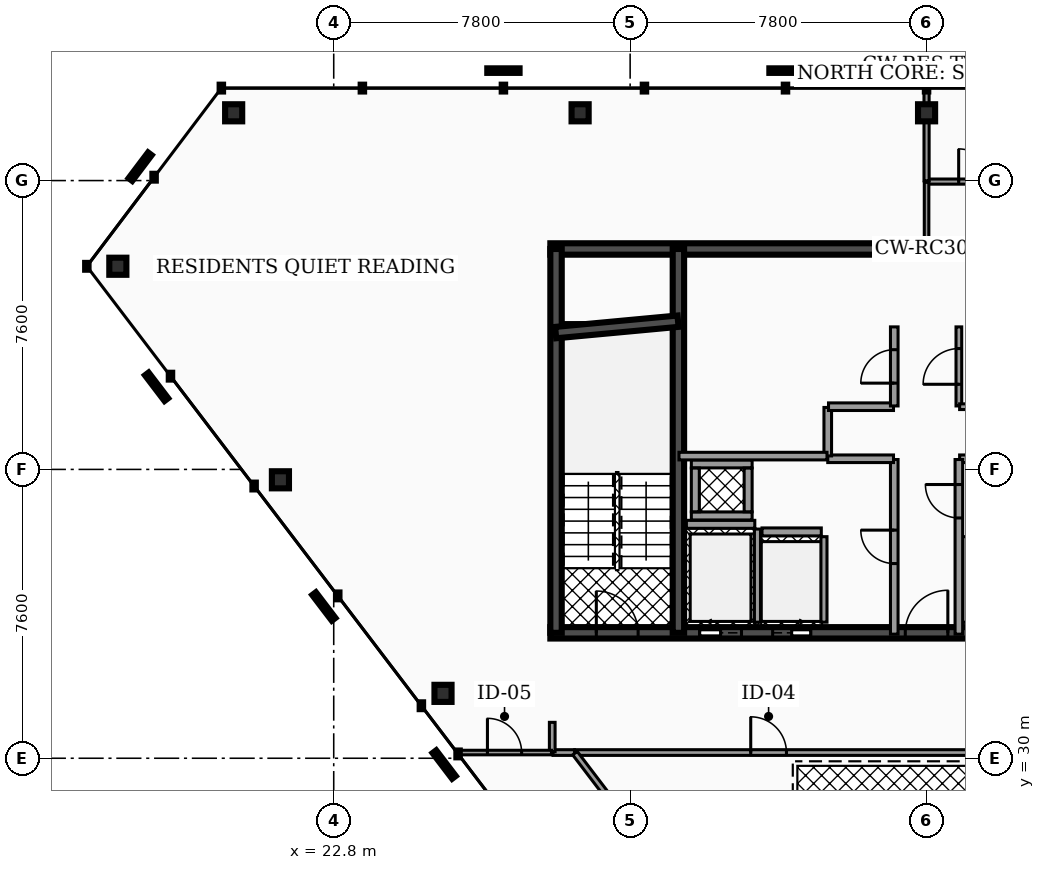
"""IFC4 building model, lengths in metres.
Left out: names, types, materials, properties, quantities, classifications, styles, units other than length and angle.
Written with IfcOpenShell. Run it as: python <this file> out.ifc"""

import sys

from ifc_helpers import new_model, si_unit, direction, frame, frame_2d, origin, origin_2d, place, context, subcontext, project, spatial, rectangle, hollow_rectangle, extrude, element, fill, save


model = new_model("IFC4")
c1 = context("Model", 3, precision=1e-05, world=origin(), true_north=direction((0.0, 1.0)))
c2 = subcontext(c1, "Body", "Model", "MODEL_VIEW")
j1 = project(units=[si_unit("LENGTHUNIT", "METRE"), si_unit("PLANEANGLEUNIT", "RADIAN")], contexts=[c1])
p1 = place(None, origin())
s1 = spatial("IfcSite", under=j1, at=p1, CompositionType="ELEMENT")
p2 = place(p1, origin())
s2 = spatial("IfcBuilding", under=s1, at=p2, CompositionType="ELEMENT")
p3 = place(p2, frame((0.0, 0.0, 282.2)))
s3 = spatial("IfcBuildingStorey", under=s2, at=p3, CompositionType="ELEMENT", Elevation=282.2)
p4 = place(p3, frame((28.5, 43.4, 0.0), z_axis=(0.0, 0.0, 1.0), x_axis=(1.0, 0.0, 0.0)))
e1 = element("IfcWall", 1, at=p4, inside=s3, PredefinedType="SHEAR", context=c2, shape_type="SweptSolid", body=[
    extrude(rectangle(XDim=19.86, YDim=0.3, at=frame_2d((9.93, 0.0))), origin(), (0.0, 0.0, 1.0), 3.18),
])
p5 = place(p3, frame((28.5, 33.3, 0.0), z_axis=(0.0, 0.0, 1.0), x_axis=(1.0, 0.0, 0.0)))
e2 = element("IfcWall", 2, at=p5, inside=s3, PredefinedType="SHEAR", context=c2, shape_type="SweptSolid", body=[
    extrude(rectangle(XDim=19.86, YDim=0.3, at=frame_2d((9.93, 0.0))), origin(), (0.0, 0.0, 1.0), 3.18),
])
p6 = place(p5, frame((3.93, 0.0, 0.0)))
e3 = element("IfcOpeningElement", 3, at=p6, cuts=e2, PredefinedType="OPENING", context=c2, shape_type="SweptSolid", body=[
    extrude(rectangle(XDim=1.1, YDim=2.15, at=frame_2d((0.55, 1.075))), frame((0.0, 0.16, 0.0), z_axis=(0.0, -1.0, 0.0), x_axis=(1.0, 0.0, 0.0)), (0.0, 0.0, 1.0), 0.32),
])
p7 = place(p5, frame((14.77, 0.0, 0.0)))
e4 = element("IfcOpeningElement", 4, at=p7, cuts=e2, PredefinedType="OPENING", context=c2, shape_type="SweptSolid", body=[
    extrude(rectangle(XDim=1.1, YDim=2.15, at=frame_2d((0.55, 1.075))), frame((0.0, 0.16, 0.0), z_axis=(0.0, -1.0, 0.0), x_axis=(1.0, 0.0, 0.0)), (0.0, 0.0, 1.0), 0.32),
])
p8 = place(p5, frame((11.25, 0.0, 0.0)))
e5 = element("IfcOpeningElement", 5, at=p8, cuts=e2, PredefinedType="OPENING", context=c2, shape_type="SweptSolid", body=[
    extrude(rectangle(XDim=1.0, YDim=2.1, at=frame_2d((0.5, 1.05))), frame((0.0, 0.16, 0.0), z_axis=(0.0, -1.0, 0.0), x_axis=(1.0, 0.0, 0.0)), (0.0, 0.0, 1.0), 0.32),
])
p9 = place(p5, frame((12.95, 0.0, 0.0)))
e6 = element("IfcOpeningElement", 6, at=p9, cuts=e2, PredefinedType="OPENING", context=c2, shape_type="SweptSolid", body=[
    extrude(rectangle(XDim=1.0, YDim=2.1, at=frame_2d((0.5, 1.05))), frame((0.0, 0.16, 0.0), z_axis=(0.0, -1.0, 0.0), x_axis=(1.0, 0.0, 0.0)), (0.0, 0.0, 1.0), 0.32),
])
p10 = place(p5, frame((5.85, 0.0, 0.0)))
e7 = element("IfcOpeningElement", 7, at=p10, cuts=e2, PredefinedType="OPENING", context=c2, shape_type="SweptSolid", body=[
    extrude(rectangle(XDim=1.0, YDim=2.1, at=frame_2d((0.5, 1.05))), frame((0.0, 0.16, 0.0), z_axis=(0.0, -1.0, 0.0), x_axis=(1.0, 0.0, 0.0)), (0.0, 0.0, 1.0), 0.32),
])
p11 = place(p5, frame((1.21, 0.0, 0.0)))
e8 = element("IfcOpeningElement", 8, at=p11, cuts=e2, PredefinedType="OPENING", context=c2, shape_type="SweptSolid", body=[
    extrude(rectangle(XDim=1.1, YDim=2.2, at=frame_2d((0.55, 1.1))), frame((0.0, 0.16, 0.0), z_axis=(0.0, -1.0, 0.0), x_axis=(1.0, 0.0, 0.0)), (0.0, 0.0, 1.0), 0.32),
])
p12 = place(p5, frame((9.34, 0.0, 0.0)))
e9 = element("IfcOpeningElement", 9, at=p12, cuts=e2, PredefinedType="OPENING", context=c2, shape_type="SweptSolid", body=[
    extrude(rectangle(XDim=1.12, YDim=2.05, at=frame_2d((0.56, 1.025))), frame((0.0, 0.16, 0.0), z_axis=(0.0, -1.0, 0.0), x_axis=(1.0, 0.0, 0.0)), (0.0, 0.0, 1.0), 0.32),
])
p13 = place(p5, frame((17.55, 0.0, 0.0)))
e10 = element("IfcOpeningElement", 10, at=p13, cuts=e2, PredefinedType="OPENING", context=c2, shape_type="SweptSolid", body=[
    extrude(rectangle(XDim=1.1, YDim=2.2, at=frame_2d((0.55, 1.1))), frame((0.0, 0.16, 0.0), z_axis=(0.0, -1.0, 0.0), x_axis=(1.0, 0.0, 0.0)), (0.0, 0.0, 1.0), 0.32),
])
for number, where, z_axis, x_axis in (
    (11, (28.65, 33.3, 0.0), (0.0, 0.0, 1.0), (0.0, 1.0, 0.0)),
    (12, (31.87, 33.3, 0.0), (0.0, 0.0, 1.0), (0.0, 1.0, 0.0)),
):
    element("IfcWall", number, at=place(p3, frame(where, z_axis=z_axis, x_axis=x_axis)), inside=s3, PredefinedType="SHEAR", context=c2, shape_type="SweptSolid", body=[
        extrude(rectangle(XDim=10.1, YDim=0.3, at=frame_2d((5.05, 0.0))), origin(), (0.0, 0.0, 1.0), 3.18),
    ])
p14 = place(p3, frame((28.64, 41.2, 0.0), z_axis=(0.0, 0.0, 1.0), x_axis=(0.995687118776, 0.092774789157, 0.0)))
e13 = element("IfcWall", 13, at=p14, inside=s3, PredefinedType="SHEAR", context=c2, shape_type="SweptSolid", body=[
    extrude(rectangle(XDim=3.234, YDim=0.3, at=frame_2d((1.617, 0.0))), origin(), (0.0, 0.0, 1.0), 3.18),
])
for number, where, z_axis, x_axis in (
    (14, (38.4, 46.983, 0.0), (0.0, 0.0, 1.0), (1.0, 0.0, 0.0)),
    (15, (29.283, 46.983, 0.0), (0.0, 0.0, 1.0), (1.0, 0.0, 0.0)),
    (16, (20.167, 46.983, 0.0), (0.0, 0.0, 1.0), (1.0, 0.0, 0.0)),
    (17, (17.119, 42.946, 0.0), (0.0, 0.0, 1.0), (1.0, 0.0, 0.0)),
    (18, (21.397, 37.327, 0.0), (0.0, 0.0, 1.0), (1.0, 0.0, 0.0)),
    (19, (25.676, 31.708, 0.0), (0.0, 0.0, 1.0), (1.0, 0.0, 0.0)),
):
    element("IfcColumn", number, at=place(p3, frame(where, z_axis=z_axis, x_axis=x_axis)), inside=s3, PredefinedType="COLUMN", context=c2, shape_type="SweptSolid", body=[
        extrude(hollow_rectangle(XDim=0.45, YDim=0.45, WallThickness=0.022, at=origin_2d()), origin(), (0.0, 0.0, 1.0), 3.18),
    ])
p15 = place(p3, frame((32.08, 36.155, 0.0), z_axis=(0.0, 0.0, 1.0), x_axis=(1.0, 0.0, 0.0)))
e20 = element("IfcWall", 20, at=p15, inside=s3, PredefinedType="SOLIDWALL", context=c2, shape_type="SweptSolid", body=[
    extrude(rectangle(XDim=1.8, YDim=0.21, at=frame_2d((0.9, 0.0))), origin(), (0.0, 0.0, 1.0), 3.18),
])
p16 = place(p3, frame((33.95, 33.58, 0.0), z_axis=(0.0, 0.0, 1.0), x_axis=(0.0, 1.0, 0.0)))
e21 = element("IfcWall", 21, at=p16, inside=s3, PredefinedType="SOLIDWALL", context=c2, shape_type="SweptSolid", body=[
    extrude(rectangle(XDim=2.45, YDim=0.16, at=frame_2d((1.225, 0.0))), origin(), (0.0, 0.0, 1.0), 3.18),
])
p17 = place(p3, frame((39.4, 33.58, 0.0), z_axis=(0.0, 0.0, 1.0), x_axis=(0.0, 1.0, 0.0)))
e22 = element("IfcWall", 22, at=p17, inside=s3, PredefinedType="SOLIDWALL", context=c2, shape_type="SweptSolid", body=[
    extrude(rectangle(XDim=2.25, YDim=0.16, at=frame_2d((1.125, 0.0))), origin(), (0.0, 0.0, 1.0), 3.18),
])
p18 = place(p3, frame((34.07, 35.955, 0.0), z_axis=(0.0, 0.0, 1.0), x_axis=(1.0, 0.0, 0.0)))
e23 = element("IfcWall", 23, at=p18, inside=s3, PredefinedType="SOLIDWALL", context=c2, shape_type="SweptSolid", body=[
    extrude(rectangle(XDim=1.56, YDim=0.21, at=frame_2d((0.78, 0.0))), origin(), (0.0, 0.0, 1.0), 3.18),
])
p19 = place(p3, frame((35.7, 33.58, 0.0), z_axis=(0.0, 0.0, 1.0), x_axis=(0.0, 1.0, 0.0)))
e24 = element("IfcWall", 24, at=p19, inside=s3, PredefinedType="SOLIDWALL", context=c2, shape_type="SweptSolid", body=[
    extrude(rectangle(XDim=2.25, YDim=0.16, at=frame_2d((1.125, 0.0))), origin(), (0.0, 0.0, 1.0), 3.18),
])
for number, where, z_axis, x_axis in (
    (25, (32.21, 36.375, 0.0), (0.0, 0.0, 1.0), (1.0, 0.0, 0.0)),
    (26, (32.21, 37.745, 0.0), (0.0, 0.0, 1.0), (1.0, 0.0, 0.0)),
):
    element("IfcWall", number, at=place(p3, frame(where, z_axis=z_axis, x_axis=x_axis)), inside=s3, PredefinedType="SOLIDWALL", context=c2, shape_type="SweptSolid", body=[
        extrude(rectangle(XDim=1.6, YDim=0.21, at=frame_2d((0.8, 0.0))), origin(), (0.0, 0.0, 1.0), 3.18),
    ])
for number, where, z_axis, x_axis in (
    (27, (32.315, 36.485, 0.0), (0.0, 0.0, 1.0), (0.0, 1.0, 0.0)),
    (28, (33.705, 36.485, 0.0), (0.0, 0.0, 1.0), (0.0, 1.0, 0.0)),
):
    element("IfcWall", number, at=place(p3, frame(where, z_axis=z_axis, x_axis=x_axis)), inside=s3, PredefinedType="SOLIDWALL", context=c2, shape_type="SweptSolid", body=[
        extrude(rectangle(XDim=1.15, YDim=0.21, at=frame_2d((0.575, 0.0))), origin(), (0.0, 0.0, 1.0), 3.18),
    ])
p20 = place(p3, frame((37.55, 33.265, 0.0), z_axis=(0.0, 0.0, 1.0), x_axis=(0.0, 1.0, 0.0)))
e29 = element("IfcWall", 29, at=p20, inside=s3, PredefinedType="PARTITIONING", context=c2, shape_type="SweptSolid", body=[
    extrude(rectangle(XDim=4.595, YDim=0.2, at=frame_2d((2.298, 0.0))), origin(), (0.0, 0.0, 1.0), 2.235),
])
p21 = place(p20, frame((1.857, 0.0, 0.0)))
e30 = element("IfcOpeningElement", 30, at=p21, cuts=e29, PredefinedType="OPENING", context=c2, shape_type="SweptSolid", body=[
    extrude(rectangle(XDim=0.88, YDim=2.05, at=frame_2d((0.44, 1.025))), frame((0.0, 0.11, 0.0), z_axis=(0.0, -1.0, 0.0), x_axis=(1.0, 0.0, 0.0)), (0.0, 0.0, 1.0), 0.22),
])
p22 = place(p3, frame((35.8, 37.88, 0.0), z_axis=(0.0, 0.0, 1.0), x_axis=(1.0, 0.0, 0.0)))
e31 = element("IfcWall", 31, at=p22, inside=s3, PredefinedType="PARTITIONING", context=c2, shape_type="SweptSolid", body=[
    extrude(rectangle(XDim=1.73, YDim=0.2, at=frame_2d((0.865, 0.0))), origin(), (0.0, 0.0, 1.0), 2.235),
])
p23 = place(p3, frame((35.8, 37.955, 0.0), z_axis=(0.0, 0.0, 1.0), x_axis=(0.0, 1.0, 0.0)))
e32 = element("IfcWall", 32, at=p23, inside=s3, PredefinedType="PARTITIONING", context=c2, shape_type="SweptSolid", body=[
    extrude(rectangle(XDim=1.275, YDim=0.2, at=frame_2d((0.637, 0.0))), origin(), (0.0, 0.0, 1.0), 2.235),
])
p24 = place(p3, frame((35.82, 39.25, 0.0), z_axis=(0.0, 0.0, 1.0), x_axis=(1.0, 0.0, 0.0)))
e33 = element("IfcWall", 33, at=p24, inside=s3, PredefinedType="PARTITIONING", context=c2, shape_type="SweptSolid", body=[
    extrude(rectangle(XDim=1.71, YDim=0.2, at=frame_2d((0.855, 0.0))), origin(), (0.0, 0.0, 1.0), 2.235),
])
p25 = place(p3, frame((37.55, 39.27, 0.0), z_axis=(0.0, 0.0, 1.0), x_axis=(0.0, 1.0, 0.0)))
e34 = element("IfcWall", 34, at=p25, inside=s3, PredefinedType="PARTITIONING", context=c2, shape_type="SweptSolid", body=[
    extrude(rectangle(XDim=2.08, YDim=0.2, at=frame_2d((1.04, 0.0))), origin(), (0.0, 0.0, 1.0), 2.235),
])
p26 = place(p25, frame((0.6, 0.0, 0.0)))
e35 = element("IfcOpeningElement", 35, at=p26, cuts=e34, PredefinedType="OPENING", context=c2, shape_type="SweptSolid", body=[
    extrude(rectangle(XDim=0.88, YDim=2.05, at=frame_2d((0.44, 1.025))), frame((0.0, 0.11, 0.0), z_axis=(0.0, -1.0, 0.0), x_axis=(1.0, 0.0, 0.0)), (0.0, 0.0, 1.0), 0.22),
])
p27 = place(p3, frame((39.27, 37.88, 0.0), z_axis=(0.0, 0.0, 1.0), x_axis=(1.0, 0.0, 0.0)))
e36 = element("IfcWall", 36, at=p27, inside=s3, PredefinedType="PARTITIONING", context=c2, shape_type="SweptSolid", body=[
    extrude(rectangle(XDim=1.93, YDim=0.2, at=frame_2d((0.965, 0.0))), origin(), (0.0, 0.0, 1.0), 2.235),
])
p28 = place(p3, frame((39.25, 33.265, 0.0), z_axis=(0.0, 0.0, 1.0), x_axis=(0.0, 1.0, 0.0)))
e37 = element("IfcWall", 37, at=p28, inside=s3, PredefinedType="PARTITIONING", context=c2, shape_type="SweptSolid", body=[
    extrude(rectangle(XDim=4.595, YDim=0.2, at=frame_2d((2.298, 0.0))), origin(), (0.0, 0.0, 1.0), 2.235),
])
p29 = place(p28, frame((3.058, 0.0, 0.0)))
e38 = element("IfcOpeningElement", 38, at=p29, cuts=e37, PredefinedType="OPENING", context=c2, shape_type="SweptSolid", body=[
    extrude(rectangle(XDim=0.88, YDim=2.05, at=frame_2d((0.44, 1.025))), frame((0.0, 0.11, 0.0), z_axis=(0.0, -1.0, 0.0), x_axis=(1.0, 0.0, 0.0)), (0.0, 0.0, 1.0), 0.22),
])
p30 = place(p3, frame((39.25, 39.27, 0.0), z_axis=(0.0, 0.0, 1.0), x_axis=(0.0, 1.0, 0.0)))
e39 = element("IfcWall", 39, at=p30, inside=s3, PredefinedType="PARTITIONING", context=c2, shape_type="SweptSolid", body=[
    extrude(rectangle(XDim=2.08, YDim=0.15, at=frame_2d((1.04, 0.0))), origin(), (0.0, 0.0, 1.0), 2.235),
])
p31 = place(p30, frame((0.57, 0.0, 0.0)))
e40 = element("IfcOpeningElement", 40, at=p31, cuts=e39, PredefinedType="OPENING", context=c2, shape_type="SweptSolid", body=[
    extrude(rectangle(XDim=0.94, YDim=2.05, at=frame_2d((0.47, 1.025))), frame((0.0, 0.085, 0.0), z_axis=(0.0, -1.0, 0.0), x_axis=(1.0, 0.0, 0.0)), (0.0, 0.0, 1.0), 0.17),
])
p32 = place(p3, frame((39.27, 39.25, 0.0), z_axis=(0.0, 0.0, 1.0), x_axis=(1.0, 0.0, 0.0)))
e41 = element("IfcWall", 41, at=p32, inside=s3, PredefinedType="PARTITIONING", context=c2, shape_type="SweptSolid", body=[
    extrude(rectangle(XDim=1.91, YDim=0.15, at=frame_2d((0.955, 0.0))), origin(), (0.0, 0.0, 1.0), 2.235),
])
p33 = place(p3, frame((31.885, 37.95, 0.0), z_axis=(0.0, 0.0, 1.0), x_axis=(1.0, 0.0, 0.0)))
e42 = element("IfcWall", 42, at=p33, inside=s3, PredefinedType="PARTITIONING", context=c2, shape_type="SweptSolid", body=[
    extrude(rectangle(XDim=3.895, YDim=0.2, at=frame_2d((1.948, 0.0))), origin(), (0.0, 0.0, 1.0), 2.235),
])
p34 = place(p3, frame((29.141, 30.15, 0.0), z_axis=(0.0, 0.0, 1.0), x_axis=(1.0, 0.0, 0.0)))
e43 = element("IfcWall", 43, at=p34, inside=s3, PredefinedType="PARTITIONING", context=c2, shape_type="SweptSolid", body=[
    extrude(rectangle(XDim=16.204, YDim=0.15, at=frame_2d((8.102, 0.0))), origin(), (0.0, 0.0, 1.0), 2.235),
])
p35 = place(p34, frame((4.632, 0.0, 0.0)))
e44 = element("IfcOpeningElement", 44, at=p35, cuts=e43, PredefinedType="OPENING", context=c2, shape_type="SweptSolid", body=[
    extrude(rectangle(XDim=0.94, YDim=2.05, at=frame_2d((0.47, 1.025))), frame((0.0, 0.085, 0.0), z_axis=(0.0, -1.0, 0.0), x_axis=(1.0, 0.0, 0.0)), (0.0, 0.0, 1.0), 0.17),
])
p36 = place(p3, frame((28.57, 30.15, 0.0), z_axis=(0.0, 0.0, 1.0), x_axis=(1.0, 0.0, 0.0)))
e45 = element("IfcWall", 45, at=p36, inside=s3, PredefinedType="PARTITIONING", context=c2, shape_type="SweptSolid", body=[
    extrude(rectangle(XDim=0.565, YDim=0.15, at=frame_2d((0.282, 0.0))), origin(), (0.0, 0.0, 1.0), 2.235),
])
p37 = place(p3, frame((28.55, 30.17, 0.0), z_axis=(0.0, 0.0, 1.0), x_axis=(0.0, 1.0, 0.0)))
e46 = element("IfcWall", 46, at=p37, inside=s3, PredefinedType="PARTITIONING", context=c2, shape_type="SweptSolid", body=[
    extrude(rectangle(XDim=0.775, YDim=0.15, at=frame_2d((0.387, 0.0))), origin(), (0.0, 0.0, 1.0), 2.235),
])
p38 = place(p3, frame((29.148, 30.134, 0.0), z_axis=(0.0, 0.0, 1.0), x_axis=(0.605873710815, -0.795560837739, 0.0)))
e47 = element("IfcWall", 47, at=p38, inside=s3, PredefinedType="PARTITIONING", context=c2, shape_type="SweptSolid", body=[
    extrude(rectangle(XDim=2.474, YDim=0.15, at=frame_2d((1.237, 0.0))), origin(), (0.0, 0.0, 1.0), 2.235),
])
p39 = place(p3, frame((26.059, 30.15, 0.0), z_axis=(0.0, 0.0, 1.0), x_axis=(1.0, 0.0, 0.0)))
e48 = element("IfcWall", 48, at=p39, inside=s3, PredefinedType="PARTITIONING", context=c2, shape_type="SweptSolid", body=[
    extrude(rectangle(XDim=2.471, YDim=0.12, at=frame_2d((1.235, 0.0))), origin(), (0.0, 0.0, 1.0), 2.235),
])
p40 = place(p39, frame((0.785, 0.0, 0.0)))
e49 = element("IfcOpeningElement", 49, at=p40, cuts=e48, PredefinedType="OPENING", context=c2, shape_type="SweptSolid", body=[
    extrude(rectangle(XDim=0.9, YDim=2.05, at=frame_2d((0.45, 1.025))), frame((0.0, 0.07, 0.0), z_axis=(0.0, -1.0, 0.0), x_axis=(1.0, 0.0, 0.0)), (0.0, 0.0, 1.0), 0.14),
])
p41 = place(p3, frame((38.42, 45.173, 0.0), z_axis=(0.0, 0.0, 1.0), x_axis=(1.0, 0.0, 0.0)))
e50 = element("IfcWall", 50, at=p41, inside=s3, PredefinedType="PARTITIONING", context=c2, shape_type="SweptSolid", body=[
    extrude(rectangle(XDim=2.51, YDim=0.135, at=frame_2d((1.255, 0.0))), origin(), (0.0, 0.0, 1.0), 2.235),
])
p42 = place(p41, frame((0.825, 0.0, 0.0)))
e51 = element("IfcOpeningElement", 51, at=p42, cuts=e50, PredefinedType="OPENING", context=c2, shape_type="SweptSolid", body=[
    extrude(rectangle(XDim=0.86, YDim=2.05, at=frame_2d((0.43, 1.025))), frame((0.0, 0.077, 0.0), z_axis=(0.0, -1.0, 0.0), x_axis=(1.0, 0.0, 0.0)), (0.0, 0.0, 1.0), 0.155),
])
p43 = place(p3, frame((38.4, 43.415, 0.0), z_axis=(0.0, 0.0, 1.0), x_axis=(0.0, 1.0, 0.0)))
e52 = element("IfcWall", 52, at=p43, inside=s3, PredefinedType="PARTITIONING", context=c2, shape_type="SweptSolid", body=[
    extrude(rectangle(XDim=1.738, YDim=0.12, at=frame_2d((0.869, 0.0))), origin(), (0.0, 0.0, 1.0), 2.235),
])
p44 = place(p3, frame((38.4, 45.193, 0.0), z_axis=(0.0, 0.0, 1.0), x_axis=(0.0, 1.0, 0.0)))
e53 = element("IfcWall", 53, at=p44, inside=s3, PredefinedType="PARTITIONING", context=c2, shape_type="SweptSolid", body=[
    extrude(rectangle(XDim=2.425, YDim=0.135, at=frame_2d((1.212, 0.0))), origin(), (0.0, 0.0, 1.0), 2.235),
])
p45 = place(p6, origin())
e54 = element("IfcDoor", 54, at=p45, inside=s3, OperationType="SLIDING_TO_LEFT", PredefinedType="DOOR", context=c2, shape_type="SweptSolid", body=[
    extrude(rectangle(XDim=1.1, YDim=2.15, at=frame_2d((0.55, 1.075))), frame((0.0, 0.025, 0.0), z_axis=(0.0, -1.0, 0.0), x_axis=(1.0, 0.0, 0.0)), (0.0, 0.0, 1.0), 0.05),
])
fill(e3, e54)
p46 = place(p10, origin())
e55 = element("IfcDoor", 55, at=p46, inside=s3, OperationType="SLIDING_TO_RIGHT", PredefinedType="DOOR", context=c2, shape_type="SweptSolid", body=[
    extrude(rectangle(XDim=1.0, YDim=2.1, at=frame_2d((0.5, 1.05))), frame((0.0, 0.025, 0.0), z_axis=(0.0, -1.0, 0.0), x_axis=(1.0, 0.0, 0.0)), (0.0, 0.0, 1.0), 0.05),
])
fill(e7, e55)
p47 = place(p11, origin())
e56 = element("IfcDoor", 56, at=p47, inside=s3, OperationType="SINGLE_SWING_LEFT", PredefinedType="DOOR", context=c2, shape_type="SweptSolid", body=[
    extrude(rectangle(XDim=1.1, YDim=2.2, at=frame_2d((0.55, 1.1))), frame((0.0, 0.025, 0.0), z_axis=(0.0, -1.0, 0.0), x_axis=(1.0, 0.0, 0.0)), (0.0, 0.0, 1.0), 0.05),
])
fill(e8, e56)
p48 = place(p12, origin())
e57 = element("IfcDoor", 57, at=p48, inside=s3, OperationType="SINGLE_SWING_RIGHT", PredefinedType="DOOR", context=c2, shape_type="SweptSolid", body=[
    extrude(rectangle(XDim=1.12, YDim=2.05, at=frame_2d((0.56, 1.025))), frame((0.0, 0.025, 0.0), z_axis=(0.0, -1.0, 0.0), x_axis=(1.0, 0.0, 0.0)), (0.0, 0.0, 1.0), 0.05),
])
fill(e9, e57)
p49 = place(p21, origin())
e58 = element("IfcDoor", 58, at=p49, inside=s3, OperationType="SINGLE_SWING_RIGHT", PredefinedType="DOOR", context=c2, shape_type="SweptSolid", body=[
    extrude(rectangle(XDim=0.88, YDim=2.05, at=frame_2d((0.44, 1.025))), frame((0.0, 0.025, 0.0), z_axis=(0.0, -1.0, 0.0), x_axis=(1.0, 0.0, 0.0)), (0.0, 0.0, 1.0), 0.05),
])
fill(e30, e58)
p50 = place(p26, origin())
e59 = element("IfcDoor", 59, at=p50, inside=s3, OperationType="SINGLE_SWING_LEFT", PredefinedType="DOOR", context=c2, shape_type="SweptSolid", body=[
    extrude(rectangle(XDim=0.88, YDim=2.05, at=frame_2d((0.44, 1.025))), frame((0.0, 0.025, 0.0), z_axis=(0.0, -1.0, 0.0), x_axis=(1.0, 0.0, 0.0)), (0.0, 0.0, 1.0), 0.05),
])
fill(e35, e59)
p51 = place(p29, origin())
e60 = element("IfcDoor", 60, at=p51, inside=s3, OperationType="SINGLE_SWING_RIGHT", PredefinedType="DOOR", context=c2, shape_type="SweptSolid", body=[
    extrude(rectangle(XDim=0.88, YDim=2.05, at=frame_2d((0.44, 1.025))), frame((0.0, 0.025, 0.0), z_axis=(0.0, -1.0, 0.0), x_axis=(1.0, 0.0, 0.0)), (0.0, 0.0, 1.0), 0.05),
])
fill(e38, e60)
p52 = place(p31, origin())
e61 = element("IfcDoor", 61, at=p52, inside=s3, OperationType="SINGLE_SWING_LEFT", PredefinedType="DOOR", context=c2, shape_type="SweptSolid", body=[
    extrude(rectangle(XDim=0.94, YDim=2.05, at=frame_2d((0.47, 1.025))), frame((0.0, 0.025, 0.0), z_axis=(0.0, -1.0, 0.0), x_axis=(1.0, 0.0, 0.0)), (0.0, 0.0, 1.0), 0.05),
])
fill(e40, e61)
p53 = place(p35, origin())
e62 = element("IfcDoor", 62, at=p53, inside=s3, OperationType="SINGLE_SWING_LEFT", PredefinedType="DOOR", context=c2, shape_type="SweptSolid", body=[
    extrude(rectangle(XDim=0.94, YDim=2.05, at=frame_2d((0.47, 1.025))), frame((0.0, 0.025, 0.0), z_axis=(0.0, -1.0, 0.0), x_axis=(1.0, 0.0, 0.0)), (0.0, 0.0, 1.0), 0.05),
])
fill(e44, e62)
p54 = place(p40, origin())
e63 = element("IfcDoor", 63, at=p54, inside=s3, OperationType="SINGLE_SWING_LEFT", PredefinedType="DOOR", context=c2, shape_type="SweptSolid", body=[
    extrude(rectangle(XDim=0.9, YDim=2.05, at=frame_2d((0.45, 1.025))), frame((0.0, 0.025, 0.0), z_axis=(0.0, -1.0, 0.0), x_axis=(1.0, 0.0, 0.0)), (0.0, 0.0, 1.0), 0.05),
])
fill(e49, e63)
p55 = place(p42, origin())
e64 = element("IfcDoor", 64, at=p55, inside=s3, OperationType="SINGLE_SWING_LEFT", PredefinedType="DOOR", context=c2, shape_type="SweptSolid", body=[
    extrude(rectangle(XDim=0.86, YDim=2.05, at=frame_2d((0.43, 1.025))), frame((0.0, 0.025, 0.0), z_axis=(0.0, -1.0, 0.0), x_axis=(1.0, 0.0, 0.0)), (0.0, 0.0, 1.0), 0.05),
])
fill(e51, e64)
save(model, sys.argv[1])
